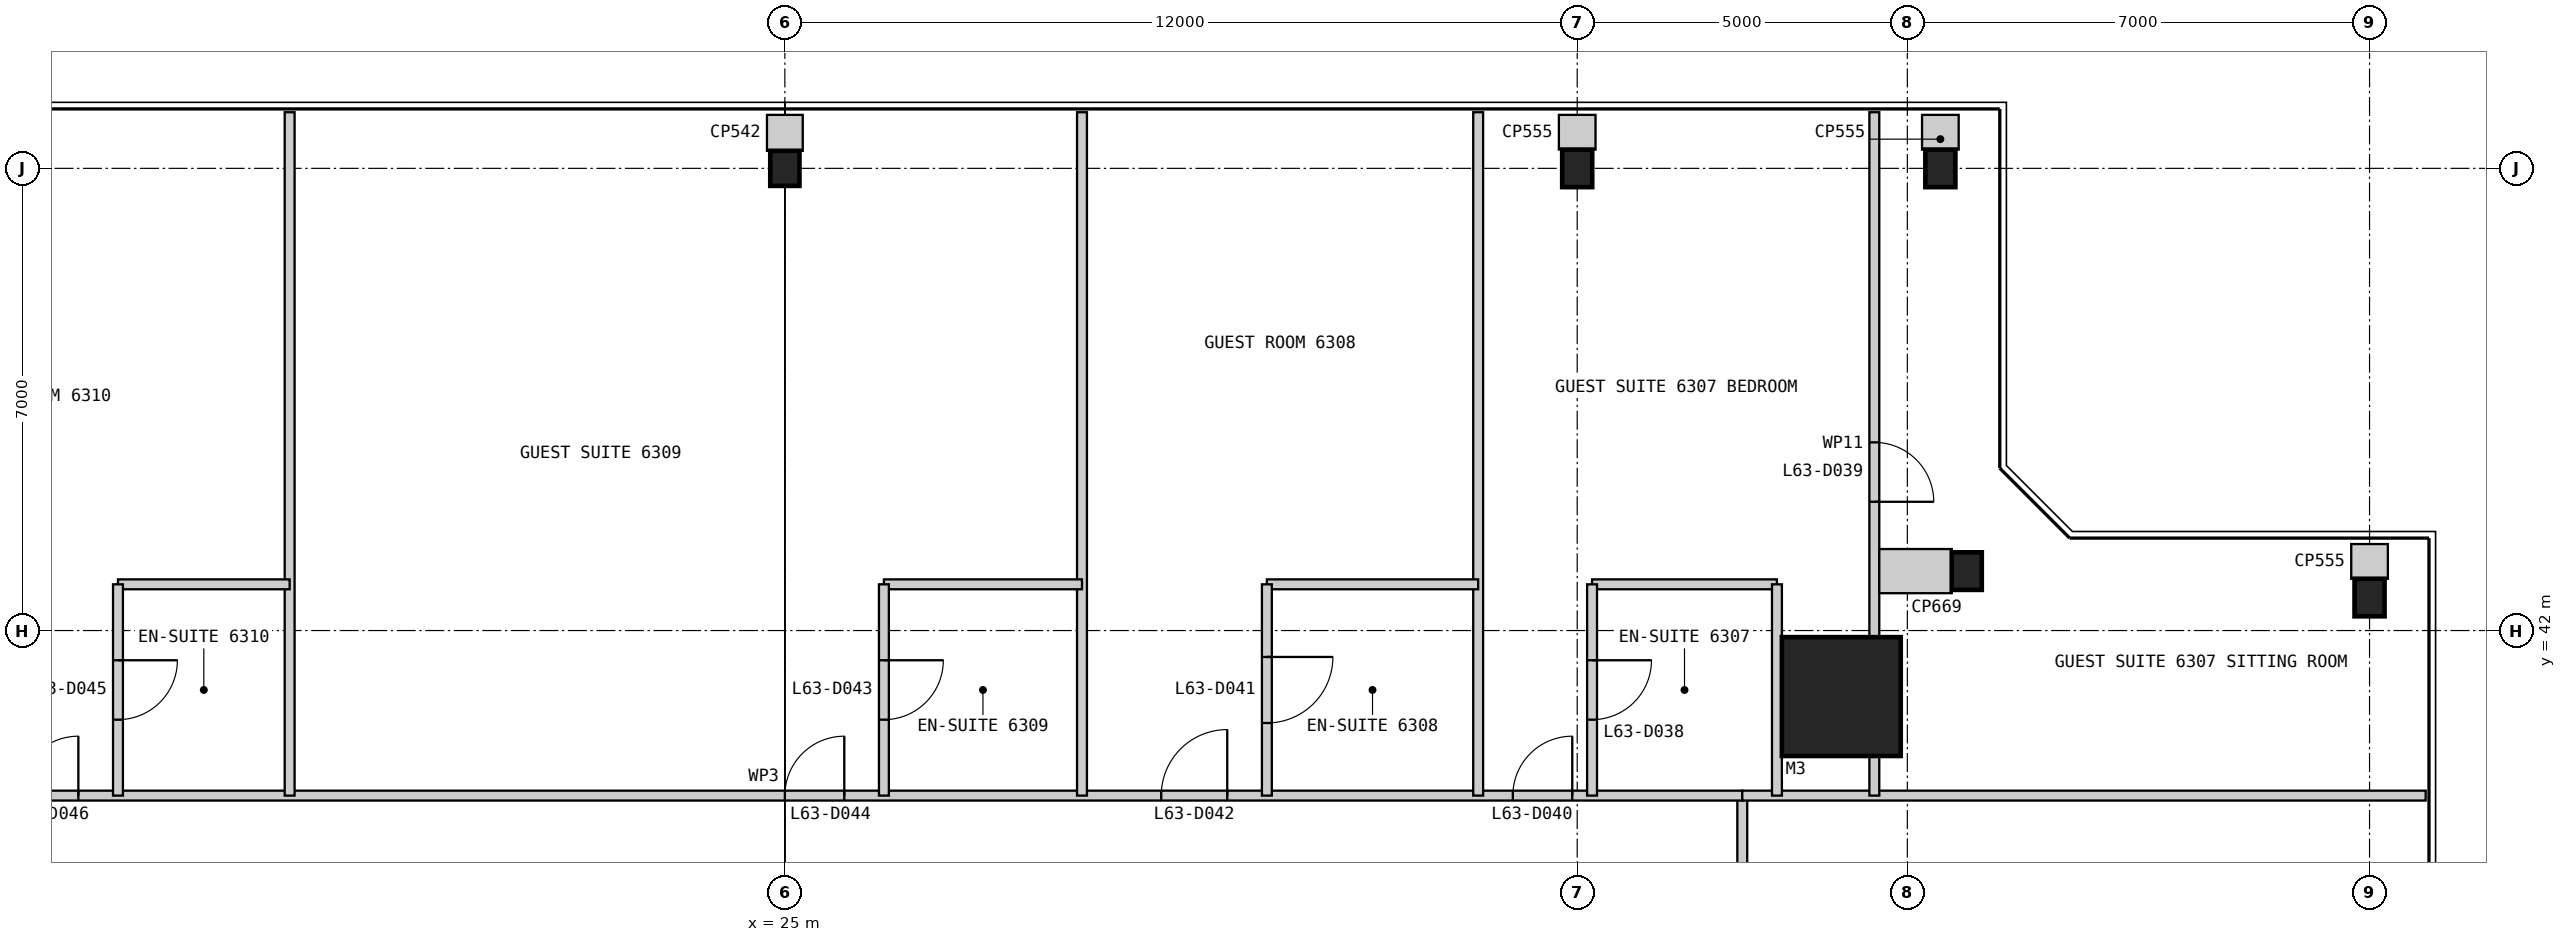
"""IFC4 building model, lengths in metres.
Left out: names, types, materials, properties, quantities, classifications, styles, units other than length and angle.
Written with IfcOpenShell. Run it as: python <this file> out.ifc"""

import sys

from ifc_helpers import new_model, si_unit, direction, frame, frame_2d, origin, origin_2d, place, context, subcontext, project, spatial, rectangle, i_section, extrude, element, fill, save


model = new_model("IFC4")
c1 = context("Model", 3, precision=1e-05, world=origin(), true_north=direction((0.0, 1.0)))
c2 = subcontext(c1, "Body", "Model", "MODEL_VIEW")
j1 = project(units=[si_unit("LENGTHUNIT", "METRE"), si_unit("PLANEANGLEUNIT", "RADIAN")], contexts=[c1])
p1 = place(None, origin())
s1 = spatial("IfcSite", under=j1, at=p1, CompositionType="ELEMENT")
p2 = place(p1, origin())
s2 = spatial("IfcBuilding", under=s1, at=p2, CompositionType="ELEMENT")
p3 = place(p2, frame((0.0, 0.0, 266.2)))
s3 = spatial("IfcBuildingStorey", under=s2, at=p3, CompositionType="ELEMENT", Elevation=266.2)
p4 = place(p3, frame((41.0, 41.0, 0.0), z_axis=(0.0, 0.0, 1.0), x_axis=(1.0, 0.0, 0.0)))
e1 = element("IfcColumn", 1, at=p4, inside=s3, PredefinedType="COLUMN", context=c2, shape_type="SweptSolid", body=[
    extrude(rectangle(XDim=1.8, YDim=1.8, at=origin_2d()), origin(), (0.0, 0.0, 1.0), 3.4),
])
for number, where, z_axis, x_axis in (
    (2, (49.0, 42.5, 0.0), (0.0, 0.0, 1.0), (1.0, 0.0, 0.0)),
    (3, (42.9, 42.9, 0.0), (0.0, 0.0, 1.0), (1.0, 0.0, 0.0)),
    (4, (42.5, 49.0, 0.0), (0.0, 0.0, 1.0), (1.0, 0.0, 0.0)),
    (5, (37.0, 49.0, 0.0), (0.0, 0.0, 1.0), (1.0, 0.0, 0.0)),
):
    element("IfcColumn", number, at=place(p3, frame(where, z_axis=z_axis, x_axis=x_axis)), inside=s3, PredefinedType="COLUMN", context=c2, shape_type="SweptSolid", body=[
        extrude(i_section(OverallWidth=0.455, OverallDepth=0.569, WebThickness=0.078, FlangeThickness=0.125, at=origin_2d()), origin(), (0.0, 0.0, 1.0), 3.4),
    ])
p5 = place(p3, frame((25.0, 49.0, 0.0), z_axis=(0.0, 0.0, 1.0), x_axis=(1.0, 0.0, 0.0)))
e6 = element("IfcColumn", 6, at=p5, inside=s3, PredefinedType="COLUMN", context=c2, shape_type="SweptSolid", body=[
    extrude(i_section(OverallWidth=0.442, OverallDepth=0.531, WebThickness=0.066, FlangeThickness=0.106, at=origin_2d()), origin(), (0.0, 0.0, 1.0), 3.4),
])
p6 = place(p3, frame((39.5, 10.5, 0.0), z_axis=(0.0, 0.0, 1.0), x_axis=(0.0, 1.0, 0.0)))
e7 = element("IfcWall", 7, at=p6, inside=s3, PredefinedType="PARTITIONING", context=c2, shape_type="SweptSolid", body=[
    extrude(rectangle(XDim=29.0, YDim=0.15, at=frame_2d((14.5, 0.0))), origin(), (0.0, 0.0, 1.0), 3.25),
])
p7 = place(p6, frame((2.4, 0.0, 0.0)))
e8 = element("IfcOpeningElement", 8, at=p7, cuts=e7, PredefinedType="OPENING", context=c2, shape_type="SweptSolid", body=[
    extrude(rectangle(XDim=0.9, YDim=2.1, at=frame_2d((0.45, 1.05))), frame((0.0, 0.085, 0.0), z_axis=(0.0, -1.0, 0.0), x_axis=(1.0, 0.0, 0.0)), (0.0, 0.0, 1.0), 0.17),
])
p8 = place(p6, frame((7.2, 0.0, 0.0)))
e9 = element("IfcOpeningElement", 9, at=p8, cuts=e7, PredefinedType="OPENING", context=c2, shape_type="SweptSolid", body=[
    extrude(rectangle(XDim=0.9, YDim=2.1, at=frame_2d((0.45, 1.05))), frame((0.0, 0.085, 0.0), z_axis=(0.0, -1.0, 0.0), x_axis=(1.0, 0.0, 0.0)), (0.0, 0.0, 1.0), 0.17),
])
p9 = place(p6, frame((13.6, 0.0, 0.0)))
e10 = element("IfcOpeningElement", 10, at=p9, cuts=e7, PredefinedType="OPENING", context=c2, shape_type="SweptSolid", body=[
    extrude(rectangle(XDim=0.9, YDim=2.1, at=frame_2d((0.45, 1.05))), frame((0.0, 0.085, 0.0), z_axis=(0.0, -1.0, 0.0), x_axis=(1.0, 0.0, 0.0)), (0.0, 0.0, 1.0), 0.17),
])
p10 = place(p6, frame((25.2, 0.0, 0.0)))
e11 = element("IfcOpeningElement", 11, at=p10, cuts=e7, PredefinedType="OPENING", context=c2, shape_type="SweptSolid", body=[
    extrude(rectangle(XDim=0.9, YDim=2.1, at=frame_2d((0.45, 1.05))), frame((0.0, 0.085, 0.0), z_axis=(0.0, -1.0, 0.0), x_axis=(1.0, 0.0, 0.0)), (0.0, 0.0, 1.0), 0.17),
])
p11 = place(p3, frame((39.5, 39.5, 0.0), z_axis=(0.0, 0.0, 1.0), x_axis=(-1.0, 0.0, 0.0)))
e12 = element("IfcWall", 12, at=p11, inside=s3, PredefinedType="PARTITIONING", context=c2, shape_type="SweptSolid", body=[
    extrude(rectangle(XDim=29.0, YDim=0.15, at=frame_2d((14.5, 0.0))), origin(), (0.0, 0.0, 1.0), 3.25),
])
p12 = place(p11, frame((2.575, 0.0, 0.0)))
e13 = element("IfcOpeningElement", 13, at=p12, cuts=e12, PredefinedType="OPENING", context=c2, shape_type="SweptSolid", body=[
    extrude(rectangle(XDim=0.9, YDim=2.1, at=frame_2d((0.45, 1.05))), frame((0.0, 0.085, 0.0), z_axis=(0.0, -1.0, 0.0), x_axis=(1.0, 0.0, 0.0)), (0.0, 0.0, 1.0), 0.17),
])
p13 = place(p11, frame((7.8, 0.0, 0.0)))
e14 = element("IfcOpeningElement", 14, at=p13, cuts=e12, PredefinedType="OPENING", context=c2, shape_type="SweptSolid", body=[
    extrude(rectangle(XDim=1.0, YDim=2.1, at=frame_2d((0.5, 1.05))), frame((0.0, 0.085, 0.0), z_axis=(0.0, -1.0, 0.0), x_axis=(1.0, 0.0, 0.0)), (0.0, 0.0, 1.0), 0.17),
])
p14 = place(p11, frame((13.6, 0.0, 0.0)))
e15 = element("IfcOpeningElement", 15, at=p14, cuts=e12, PredefinedType="OPENING", context=c2, shape_type="SweptSolid", body=[
    extrude(rectangle(XDim=0.9, YDim=2.1, at=frame_2d((0.45, 1.05))), frame((0.0, 0.085, 0.0), z_axis=(0.0, -1.0, 0.0), x_axis=(1.0, 0.0, 0.0)), (0.0, 0.0, 1.0), 0.17),
])
p15 = place(p11, frame((25.2, 0.0, 0.0)))
e16 = element("IfcOpeningElement", 16, at=p15, cuts=e12, PredefinedType="OPENING", context=c2, shape_type="SweptSolid", body=[
    extrude(rectangle(XDim=0.9, YDim=2.1, at=frame_2d((0.45, 1.05))), frame((0.0, 0.085, 0.0), z_axis=(0.0, -1.0, 0.0), x_axis=(1.0, 0.0, 0.0)), (0.0, 0.0, 1.0), 0.17),
])
p16 = place(p3, frame((49.85, 39.5, 0.0), z_axis=(0.0, 0.0, 1.0), x_axis=(-1.0, 0.0, 0.0)))
e17 = element("IfcWall", 17, at=p16, inside=s3, PredefinedType="PARTITIONING", context=c2, shape_type="SweptSolid", body=[
    extrude(rectangle(XDim=10.35, YDim=0.15, at=frame_2d((5.175, 0.0))), origin(), (0.0, 0.0, 1.0), 3.25),
])
p17 = place(p3, frame((40.025, 42.7, 0.0), z_axis=(0.0, 0.0, 1.0), x_axis=(-1.0, 0.0, 0.0)))
e18 = element("IfcWall", 18, at=p17, inside=s3, PredefinedType="PARTITIONING", context=c2, shape_type="SweptSolid", body=[
    extrude(rectangle(XDim=2.8, YDim=0.15, at=frame_2d((1.4, 0.0))), origin(), (0.0, 0.0, 1.0), 3.25),
])
p18 = place(p3, frame((37.225, 42.7, 0.0), z_axis=(0.0, 0.0, 1.0), x_axis=(0.0, -1.0, 0.0)))
e19 = element("IfcWall", 19, at=p18, inside=s3, PredefinedType="PARTITIONING", context=c2, shape_type="SweptSolid", body=[
    extrude(rectangle(XDim=3.2, YDim=0.15, at=frame_2d((1.6, 0.0))), origin(), (0.0, 0.0, 1.0), 3.25),
])
p19 = place(p18, frame((1.15, 0.0, 0.0)))
e20 = element("IfcOpeningElement", 20, at=p19, cuts=e19, PredefinedType="OPENING", context=c2, shape_type="SweptSolid", body=[
    extrude(rectangle(XDim=0.9, YDim=2.1, at=frame_2d((0.45, 1.05))), frame((0.0, 0.085, 0.0), z_axis=(0.0, -1.0, 0.0), x_axis=(1.0, 0.0, 0.0)), (0.0, 0.0, 1.0), 0.17),
])
p20 = place(p3, frame((40.025, 42.7, 0.0), z_axis=(0.0, 0.0, 1.0), x_axis=(0.0, -1.0, 0.0)))
e21 = element("IfcWall", 21, at=p20, inside=s3, PredefinedType="PARTITIONING", context=c2, shape_type="SweptSolid", body=[
    extrude(rectangle(XDim=3.2, YDim=0.15, at=frame_2d((1.6, 0.0))), origin(), (0.0, 0.0, 1.0), 3.25),
])
p21 = place(p3, frame((41.5, 49.85, 0.0), z_axis=(0.0, 0.0, 1.0), x_axis=(0.0, -1.0, 0.0)))
e22 = element("IfcWall", 22, at=p21, inside=s3, PredefinedType="PARTITIONING", context=c2, shape_type="SweptSolid", body=[
    extrude(rectangle(XDim=10.35, YDim=0.15, at=frame_2d((5.175, 0.0))), origin(), (0.0, 0.0, 1.0), 3.25),
])
p22 = place(p21, frame((5.0, 0.0, 0.0)))
e23 = element("IfcOpeningElement", 23, at=p22, cuts=e22, PredefinedType="OPENING", context=c2, shape_type="SweptSolid", body=[
    extrude(rectangle(XDim=0.9, YDim=2.1, at=frame_2d((0.45, 1.05))), frame((0.0, 0.085, 0.0), z_axis=(0.0, -1.0, 0.0), x_axis=(1.0, 0.0, 0.0)), (0.0, 0.0, 1.0), 0.17),
])
p23 = place(p3, frame((35.5, 49.85, 0.0), z_axis=(0.0, 0.0, 1.0), x_axis=(0.0, -1.0, 0.0)))
e24 = element("IfcWall", 24, at=p23, inside=s3, PredefinedType="PARTITIONING", context=c2, shape_type="SweptSolid", body=[
    extrude(rectangle(XDim=10.35, YDim=0.15, at=frame_2d((5.175, 0.0))), origin(), (0.0, 0.0, 1.0), 3.25),
])
p24 = place(p3, frame((35.5, 42.7, 0.0), z_axis=(0.0, 0.0, 1.0), x_axis=(-1.0, 0.0, 0.0)))
e25 = element("IfcWall", 25, at=p24, inside=s3, PredefinedType="PARTITIONING", context=c2, shape_type="SweptSolid", body=[
    extrude(rectangle(XDim=3.2, YDim=0.15, at=frame_2d((1.6, 0.0))), origin(), (0.0, 0.0, 1.0), 3.25),
])
p25 = place(p3, frame((32.3, 42.7, 0.0), z_axis=(0.0, 0.0, 1.0), x_axis=(0.0, -1.0, 0.0)))
e26 = element("IfcWall", 26, at=p25, inside=s3, PredefinedType="PARTITIONING", context=c2, shape_type="SweptSolid", body=[
    extrude(rectangle(XDim=3.2, YDim=0.15, at=frame_2d((1.6, 0.0))), origin(), (0.0, 0.0, 1.0), 3.25),
])
p26 = place(p25, frame((1.1, 0.0, 0.0)))
e27 = element("IfcOpeningElement", 27, at=p26, cuts=e26, PredefinedType="OPENING", context=c2, shape_type="SweptSolid", body=[
    extrude(rectangle(XDim=1.0, YDim=2.1, at=frame_2d((0.5, 1.05))), frame((0.0, 0.085, 0.0), z_axis=(0.0, -1.0, 0.0), x_axis=(1.0, 0.0, 0.0)), (0.0, 0.0, 1.0), 0.17),
])
p27 = place(p3, frame((29.5, 49.85, 0.0), z_axis=(0.0, 0.0, 1.0), x_axis=(0.0, -1.0, 0.0)))
e28 = element("IfcWall", 28, at=p27, inside=s3, PredefinedType="PARTITIONING", context=c2, shape_type="SweptSolid", body=[
    extrude(rectangle(XDim=10.35, YDim=0.15, at=frame_2d((5.175, 0.0))), origin(), (0.0, 0.0, 1.0), 3.25),
])
p28 = place(p3, frame((29.5, 42.7, 0.0), z_axis=(0.0, 0.0, 1.0), x_axis=(-1.0, 0.0, 0.0)))
e29 = element("IfcWall", 29, at=p28, inside=s3, PredefinedType="PARTITIONING", context=c2, shape_type="SweptSolid", body=[
    extrude(rectangle(XDim=3.0, YDim=0.15, at=frame_2d((1.5, 0.0))), origin(), (0.0, 0.0, 1.0), 3.25),
])
p29 = place(p3, frame((26.5, 42.7, 0.0), z_axis=(0.0, 0.0, 1.0), x_axis=(0.0, -1.0, 0.0)))
e30 = element("IfcWall", 30, at=p29, inside=s3, PredefinedType="PARTITIONING", context=c2, shape_type="SweptSolid", body=[
    extrude(rectangle(XDim=3.2, YDim=0.15, at=frame_2d((1.6, 0.0))), origin(), (0.0, 0.0, 1.0), 3.25),
])
p30 = place(p29, frame((1.15, 0.0, 0.0)))
e31 = element("IfcOpeningElement", 31, at=p30, cuts=e30, PredefinedType="OPENING", context=c2, shape_type="SweptSolid", body=[
    extrude(rectangle(XDim=0.9, YDim=2.1, at=frame_2d((0.45, 1.05))), frame((0.0, 0.085, 0.0), z_axis=(0.0, -1.0, 0.0), x_axis=(1.0, 0.0, 0.0)), (0.0, 0.0, 1.0), 0.17),
])
p31 = place(p3, frame((17.5, 49.85, 0.0), z_axis=(0.0, 0.0, 1.0), x_axis=(0.0, -1.0, 0.0)))
e32 = element("IfcWall", 32, at=p31, inside=s3, PredefinedType="PARTITIONING", context=c2, shape_type="SweptSolid", body=[
    extrude(rectangle(XDim=10.35, YDim=0.15, at=frame_2d((5.175, 0.0))), origin(), (0.0, 0.0, 1.0), 3.25),
])
p32 = place(p3, frame((17.5, 42.7, 0.0), z_axis=(0.0, 0.0, 1.0), x_axis=(-1.0, 0.0, 0.0)))
e33 = element("IfcWall", 33, at=p32, inside=s3, PredefinedType="PARTITIONING", context=c2, shape_type="SweptSolid", body=[
    extrude(rectangle(XDim=2.6, YDim=0.15, at=frame_2d((1.3, 0.0))), origin(), (0.0, 0.0, 1.0), 3.25),
])
p33 = place(p3, frame((14.9, 42.7, 0.0), z_axis=(0.0, 0.0, 1.0), x_axis=(0.0, -1.0, 0.0)))
e34 = element("IfcWall", 34, at=p33, inside=s3, PredefinedType="PARTITIONING", context=c2, shape_type="SweptSolid", body=[
    extrude(rectangle(XDim=3.2, YDim=0.15, at=frame_2d((1.6, 0.0))), origin(), (0.0, 0.0, 1.0), 3.25),
])
p34 = place(p33, frame((1.15, 0.0, 0.0)))
e35 = element("IfcOpeningElement", 35, at=p34, cuts=e34, PredefinedType="OPENING", context=c2, shape_type="SweptSolid", body=[
    extrude(rectangle(XDim=0.9, YDim=2.1, at=frame_2d((0.45, 1.05))), frame((0.0, 0.085, 0.0), z_axis=(0.0, -1.0, 0.0), x_axis=(1.0, 0.0, 0.0)), (0.0, 0.0, 1.0), 0.17),
])
p35 = place(p3, frame((49.0, 43.31, 0.0), z_axis=(0.0, 0.0, 1.0), x_axis=(0.0, -1.0, 0.0)))
e36 = element("IfcWall", 36, at=p35, inside=s3, PredefinedType="PARTITIONING", context=c2, shape_type="SweptSolid", body=[
    extrude(rectangle(XDim=0.526, YDim=0.555, at=frame_2d((0.263, 0.0))), origin(), (0.0, 0.0, 1.0), 3.25),
])
p36 = place(p3, frame((41.575, 42.9, 0.0), z_axis=(0.0, 0.0, 1.0), x_axis=(1.0, 0.0, 0.0)))
e37 = element("IfcWall", 37, at=p36, inside=s3, PredefinedType="PARTITIONING", context=c2, shape_type="SweptSolid", body=[
    extrude(rectangle(XDim=1.098, YDim=0.669, at=frame_2d((0.549, 0.0))), origin(), (0.0, 0.0, 1.0), 3.25),
])
for number, where, z_axis, x_axis in (
    (38, (42.5, 49.81, 0.0), (0.0, 0.0, 1.0), (0.0, -1.0, 0.0)),
    (39, (37.0, 49.81, 0.0), (0.0, 0.0, 1.0), (0.0, -1.0, 0.0)),
):
    element("IfcWall", number, at=place(p3, frame(where, z_axis=z_axis, x_axis=x_axis)), inside=s3, PredefinedType="PARTITIONING", context=c2, shape_type="SweptSolid", body=[
        extrude(rectangle(XDim=0.526, YDim=0.555, at=frame_2d((0.263, 0.0))), origin(), (0.0, 0.0, 1.0), 3.25),
    ])
p37 = place(p3, frame((25.0, 49.81, 0.0), z_axis=(0.0, 0.0, 1.0), x_axis=(0.0, -1.0, 0.0)))
e40 = element("IfcWall", 40, at=p37, inside=s3, PredefinedType="PARTITIONING", context=c2, shape_type="SweptSolid", body=[
    extrude(rectangle(XDim=0.545, YDim=0.542, at=frame_2d((0.272, 0.0))), origin(), (0.0, 0.0, 1.0), 3.25),
])
p38 = place(p19, origin())
e41 = element("IfcDoor", 41, at=p38, inside=s3, OperationType="SINGLE_SWING_LEFT", PredefinedType="DOOR", context=c2, shape_type="SweptSolid", body=[
    extrude(rectangle(XDim=0.9, YDim=2.1, at=frame_2d((0.45, 1.05))), frame((0.0, 0.025, 0.0), z_axis=(0.0, -1.0, 0.0), x_axis=(1.0, 0.0, 0.0)), (0.0, 0.0, 1.0), 0.05),
])
fill(e20, e41)
p39 = place(p22, origin())
e42 = element("IfcDoor", 42, at=p39, inside=s3, OperationType="SINGLE_SWING_RIGHT", PredefinedType="DOOR", context=c2, shape_type="SweptSolid", body=[
    extrude(rectangle(XDim=0.9, YDim=2.1, at=frame_2d((0.45, 1.05))), frame((0.0, 0.025, 0.0), z_axis=(0.0, -1.0, 0.0), x_axis=(1.0, 0.0, 0.0)), (0.0, 0.0, 1.0), 0.05),
])
fill(e23, e42)
p40 = place(p12, frame((0.9, 0.0, 0.0), z_axis=(0.0, 0.0, 1.0), x_axis=(-1.0, 0.0, 0.0)))
e43 = element("IfcDoor", 43, at=p40, inside=s3, OperationType="SINGLE_SWING_RIGHT", PredefinedType="DOOR", context=c2, shape_type="SweptSolid", body=[
    extrude(rectangle(XDim=0.9, YDim=2.1, at=frame_2d((0.45, 1.05))), frame((0.0, 0.025, 0.0), z_axis=(0.0, -1.0, 0.0), x_axis=(1.0, 0.0, 0.0)), (0.0, 0.0, 1.0), 0.05),
])
fill(e13, e43)
p41 = place(p26, origin())
e44 = element("IfcDoor", 44, at=p41, inside=s3, OperationType="SINGLE_SWING_LEFT", PredefinedType="DOOR", context=c2, shape_type="SweptSolid", body=[
    extrude(rectangle(XDim=1.0, YDim=2.1, at=frame_2d((0.5, 1.05))), frame((0.0, 0.025, 0.0), z_axis=(0.0, -1.0, 0.0), x_axis=(1.0, 0.0, 0.0)), (0.0, 0.0, 1.0), 0.05),
])
fill(e27, e44)
p42 = place(p13, frame((1.0, 0.0, 0.0), z_axis=(0.0, 0.0, 1.0), x_axis=(-1.0, 0.0, 0.0)))
e45 = element("IfcDoor", 45, at=p42, inside=s3, OperationType="SINGLE_SWING_RIGHT", PredefinedType="DOOR", context=c2, shape_type="SweptSolid", body=[
    extrude(rectangle(XDim=1.0, YDim=2.1, at=frame_2d((0.5, 1.05))), frame((0.0, 0.025, 0.0), z_axis=(0.0, -1.0, 0.0), x_axis=(1.0, 0.0, 0.0)), (0.0, 0.0, 1.0), 0.05),
])
fill(e14, e45)
p43 = place(p30, origin())
e46 = element("IfcDoor", 46, at=p43, inside=s3, OperationType="SINGLE_SWING_LEFT", PredefinedType="DOOR", context=c2, shape_type="SweptSolid", body=[
    extrude(rectangle(XDim=0.9, YDim=2.1, at=frame_2d((0.45, 1.05))), frame((0.0, 0.025, 0.0), z_axis=(0.0, -1.0, 0.0), x_axis=(1.0, 0.0, 0.0)), (0.0, 0.0, 1.0), 0.05),
])
fill(e31, e46)
p44 = place(p14, frame((0.9, 0.0, 0.0), z_axis=(0.0, 0.0, 1.0), x_axis=(-1.0, 0.0, 0.0)))
e47 = element("IfcDoor", 47, at=p44, inside=s3, OperationType="SINGLE_SWING_RIGHT", PredefinedType="DOOR", context=c2, shape_type="SweptSolid", body=[
    extrude(rectangle(XDim=0.9, YDim=2.1, at=frame_2d((0.45, 1.05))), frame((0.0, 0.025, 0.0), z_axis=(0.0, -1.0, 0.0), x_axis=(1.0, 0.0, 0.0)), (0.0, 0.0, 1.0), 0.05),
])
fill(e15, e47)
p45 = place(p34, origin())
e48 = element("IfcDoor", 48, at=p45, inside=s3, OperationType="SINGLE_SWING_LEFT", PredefinedType="DOOR", context=c2, shape_type="SweptSolid", body=[
    extrude(rectangle(XDim=0.9, YDim=2.1, at=frame_2d((0.45, 1.05))), frame((0.0, 0.025, 0.0), z_axis=(0.0, -1.0, 0.0), x_axis=(1.0, 0.0, 0.0)), (0.0, 0.0, 1.0), 0.05),
])
fill(e35, e48)
p46 = place(p15, frame((0.9, 0.0, 0.0), z_axis=(0.0, 0.0, 1.0), x_axis=(-1.0, 0.0, 0.0)))
e49 = element("IfcDoor", 49, at=p46, inside=s3, OperationType="SINGLE_SWING_RIGHT", PredefinedType="DOOR", context=c2, shape_type="SweptSolid", body=[
    extrude(rectangle(XDim=0.9, YDim=2.1, at=frame_2d((0.45, 1.05))), frame((0.0, 0.025, 0.0), z_axis=(0.0, -1.0, 0.0), x_axis=(1.0, 0.0, 0.0)), (0.0, 0.0, 1.0), 0.05),
])
fill(e16, e49)
save(model, sys.argv[1])
